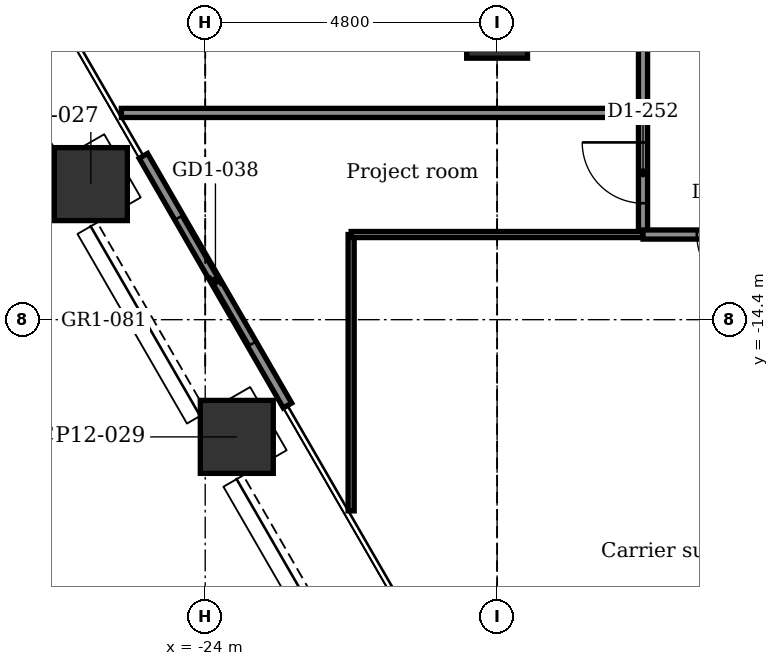
"""IFC4 building model, lengths in metres.
Left out: names, types, materials, properties, quantities, classifications, styles, units other than length and angle.
Written with IfcOpenShell. Run it as: python <this file> out.ifc"""

import sys

from ifc_helpers import new_model, si_unit, direction, frame, frame_2d, origin, origin_2d, place, context, subcontext, project, spatial, rectangle, extrude, element, fill, save


model = new_model("IFC4")
c1 = context("Model", 3, precision=1e-05, world=origin(), true_north=direction((0.0, 1.0)))
c2 = subcontext(c1, "Body", "Model", "MODEL_VIEW")
j1 = project(units=[si_unit("LENGTHUNIT", "METRE"), si_unit("PLANEANGLEUNIT", "RADIAN")], contexts=[c1])
p1 = place(None, origin())
s1 = spatial("IfcSite", under=j1, at=p1, CompositionType="ELEMENT")
p2 = place(p1, origin())
s2 = spatial("IfcBuilding", under=s1, at=p2, CompositionType="ELEMENT")
p3 = place(p2, frame((0.0, 0.0, 91.4)))
s3 = spatial("IfcBuildingStorey", under=s2, at=p3, CompositionType="ELEMENT", Elevation=91.4)
for number, where, z_axis, x_axis in (
    (1, (-23.48, -16.328, -0.2), (0.0, 0.0, 1.0), (0.866, 0.5, 0.0)),
    (2, (-25.88, -12.171, -0.2), (0.0, 0.0, 1.0), (0.866, 0.5, 0.0)),
):
    element("IfcColumn", number, at=place(p3, frame(where, z_axis=z_axis, x_axis=x_axis)), inside=s3, PredefinedType="COLUMN", context=c2, shape_type="SweptSolid", body=[
        extrude(rectangle(XDim=1.2, YDim=1.2, at=origin_2d()), origin(), (0.0, 0.0, 1.0), 4.5),
    ])
p4 = place(p3, frame((-19.2, -9.6, -0.2), z_axis=(0.0, 0.0, 1.0), x_axis=(1.0, 0.0, 0.0)))
e3 = element("IfcColumn", 3, at=p4, inside=s3, PredefinedType="COLUMN", context=c2, shape_type="SweptSolid", body=[
    extrude(rectangle(XDim=1.0, YDim=1.0, at=origin_2d()), origin(), (0.0, 0.0, 1.0), 4.5),
])
p5 = place(p3, frame((-22.647, -15.812, 0.0), z_axis=(0.0, 0.0, 1.0), x_axis=(-0.499978080042, 0.866038058908, 0.0)))
e4 = element("IfcWall", 4, at=p5, inside=s3, PredefinedType="PARTITIONING", context=c2, shape_type="SweptSolid", body=[
    extrude(rectangle(XDim=4.74, YDim=0.16, at=frame_2d((2.37, 0.0))), origin(), (0.0, 0.0, 1.0), 4.3),
])
p6 = place(p5, frame((1.17, 0.0, 0.0)))
e5 = element("IfcOpeningElement", 5, at=p6, cuts=e4, PredefinedType="OPENING", context=c2, shape_type="SweptSolid", body=[
    extrude(rectangle(XDim=2.4, YDim=2.4, at=frame_2d((1.2, 1.2))), frame((0.0, 0.09, 0.0), z_axis=(0.0, -1.0, 0.0), x_axis=(1.0, 0.0, 0.0)), (0.0, 0.0, 1.0), 0.18),
])
p7 = place(p3, frame((-16.8, -13.0, 0.0), z_axis=(0.0, 0.0, 1.0), x_axis=(0.0, 1.0, 0.0)))
e6 = element("IfcWall", 6, at=p7, inside=s3, PredefinedType="PARTITIONING", context=c2, shape_type="SweptSolid", body=[
    extrude(rectangle(XDim=9.05, YDim=0.15, at=frame_2d((4.525, 0.0))), origin(), (0.0, 0.0, 1.0), 4.3),
])
p8 = place(p7, frame((0.515, 0.0, 0.0)))
e7 = element("IfcOpeningElement", 7, at=p8, cuts=e6, PredefinedType="OPENING", context=c2, shape_type="SweptSolid", body=[
    extrude(rectangle(XDim=1.0, YDim=2.1, at=frame_2d((0.5, 1.05))), frame((0.0, 0.085, 0.0), z_axis=(0.0, -1.0, 0.0), x_axis=(1.0, 0.0, 0.0)), (0.0, 0.0, 1.0), 0.17),
])
p9 = place(p7, frame((5.8, 0.0, 0.0)))
e8 = element("IfcOpeningElement", 8, at=p9, cuts=e6, PredefinedType="OPENING", context=c2, shape_type="SweptSolid", body=[
    extrude(rectangle(XDim=1.0, YDim=2.1, at=frame_2d((0.5, 1.05))), frame((0.0, 0.085, 0.0), z_axis=(0.0, -1.0, 0.0), x_axis=(1.0, 0.0, 0.0)), (0.0, 0.0, 1.0), 0.17),
])
p10 = place(p3, frame((-21.6, -17.545, 0.0), z_axis=(0.0, 0.0, 1.0), x_axis=(0.0, 1.0, 0.0)))
e9 = element("IfcWall", 9, at=p10, inside=s3, PredefinedType="PARTITIONING", context=c2, shape_type="SweptSolid", body=[
    extrude(rectangle(XDim=4.545, YDim=0.1, at=frame_2d((2.272, 0.0))), origin(), (0.0, 0.0, 1.0), 4.3),
])
p11 = place(p3, frame((-21.6, -13.0, 0.0), z_axis=(0.0, 0.0, 1.0), x_axis=(1.0, 0.0, 0.0)))
e10 = element("IfcWall", 10, at=p11, inside=s3, PredefinedType="PARTITIONING", context=c2, shape_type="SweptSolid", body=[
    extrude(rectangle(XDim=4.8, YDim=0.1, at=frame_2d((2.4, 0.0))), origin(), (0.0, 0.0, 1.0), 4.3),
])
p12 = place(p3, frame((-16.8, -13.0, 0.0), z_axis=(0.0, 0.0, 1.0), x_axis=(1.0, 0.0, 0.0)))
e11 = element("IfcWall", 11, at=p12, inside=s3, PredefinedType="PARTITIONING", context=c2, shape_type="SweptSolid", body=[
    extrude(rectangle(XDim=31.324, YDim=0.15, at=frame_2d((15.662, 0.0))), origin(), (0.0, 0.0, 1.0), 4.3),
])
p13 = place(p12, frame((0.885, 0.0, 0.0)))
e12 = element("IfcOpeningElement", 12, at=p13, cuts=e11, PredefinedType="OPENING", context=c2, shape_type="SweptSolid", body=[
    extrude(rectangle(XDim=1.0, YDim=2.1, at=frame_2d((0.5, 1.05))), frame((0.0, 0.085, 0.0), z_axis=(0.0, -1.0, 0.0), x_axis=(1.0, 0.0, 0.0)), (0.0, 0.0, 1.0), 0.17),
])
p14 = place(p12, frame((5.5, 0.0, 0.0)))
e13 = element("IfcOpeningElement", 13, at=p14, cuts=e11, PredefinedType="OPENING", context=c2, shape_type="SweptSolid", body=[
    extrude(rectangle(XDim=1.0, YDim=2.1, at=frame_2d((0.5, 1.05))), frame((0.0, 0.085, 0.0), z_axis=(0.0, -1.0, 0.0), x_axis=(1.0, 0.0, 0.0)), (0.0, 0.0, 1.0), 0.17),
])
p15 = place(p12, frame((11.095, 0.0, 0.0)))
e14 = element("IfcOpeningElement", 14, at=p15, cuts=e11, PredefinedType="OPENING", context=c2, shape_type="SweptSolid", body=[
    extrude(rectangle(XDim=1.0, YDim=2.1, at=frame_2d((0.5, 1.05))), frame((0.0, 0.085, 0.0), z_axis=(0.0, -1.0, 0.0), x_axis=(1.0, 0.0, 0.0)), (0.0, 0.0, 1.0), 0.17),
])
p16 = place(p12, frame((15.175, 0.0, 0.0)))
e15 = element("IfcOpeningElement", 15, at=p16, cuts=e11, PredefinedType="OPENING", context=c2, shape_type="SweptSolid", body=[
    extrude(rectangle(XDim=1.0, YDim=2.1, at=frame_2d((0.5, 1.05))), frame((0.0, 0.085, 0.0), z_axis=(0.0, -1.0, 0.0), x_axis=(1.0, 0.0, 0.0)), (0.0, 0.0, 1.0), 0.17),
])
p17 = place(p12, frame((18.7, 0.0, 0.0)))
e16 = element("IfcOpeningElement", 16, at=p17, cuts=e11, PredefinedType="OPENING", context=c2, shape_type="SweptSolid", body=[
    extrude(rectangle(XDim=1.0, YDim=2.1, at=frame_2d((0.5, 1.05))), frame((0.0, 0.085, 0.0), z_axis=(0.0, -1.0, 0.0), x_axis=(1.0, 0.0, 0.0)), (0.0, 0.0, 1.0), 0.17),
])
p18 = place(p12, frame((23.5, 0.0, 0.0)))
e17 = element("IfcOpeningElement", 17, at=p18, cuts=e11, PredefinedType="OPENING", context=c2, shape_type="SweptSolid", body=[
    extrude(rectangle(XDim=1.0, YDim=2.1, at=frame_2d((0.5, 1.05))), frame((0.0, 0.085, 0.0), z_axis=(0.0, -1.0, 0.0), x_axis=(1.0, 0.0, 0.0)), (0.0, 0.0, 1.0), 0.17),
])
p19 = place(p12, frame((27.4, 0.0, 0.9)))
e18 = element("IfcOpeningElement", 18, at=p19, cuts=e11, PredefinedType="OPENING", context=c2, shape_type="SweptSolid", body=[
    extrude(rectangle(XDim=2.4, YDim=1.5, at=frame_2d((1.2, 0.75))), frame((0.0, 0.085, 0.0), z_axis=(0.0, -1.0, 0.0), x_axis=(1.0, 0.0, 0.0)), (0.0, 0.0, 1.0), 0.17),
])
p20 = place(p3, frame((-25.378, -11.0, 0.0), z_axis=(0.0, 0.0, 1.0), x_axis=(1.0, 0.0, 0.0)))
e19 = element("IfcWall", 19, at=p20, inside=s3, PredefinedType="PARTITIONING", context=c2, shape_type="SweptSolid", body=[
    extrude(rectangle(XDim=8.578, YDim=0.15, at=frame_2d((4.289, 0.0))), origin(), (0.0, 0.0, 1.0), 4.3),
])
p21 = place(p6, origin())
e20 = element("IfcDoor", 20, at=p21, inside=s3, OperationType="DOUBLE_DOOR_SLIDING", PredefinedType="DOOR", context=c2, shape_type="SweptSolid", body=[
    extrude(rectangle(XDim=2.4, YDim=2.4, at=frame_2d((1.2, 1.2))), frame((0.0, 0.025, 0.0), z_axis=(0.0, -1.0, 0.0), x_axis=(1.0, 0.0, 0.0)), (0.0, 0.0, 1.0), 0.05),
])
fill(e5, e20)
p22 = place(p13, frame((1.0, 0.0, 0.0), z_axis=(0.0, 0.0, 1.0), x_axis=(-1.0, 0.0, 0.0)))
e21 = element("IfcDoor", 21, at=p22, inside=s3, OperationType="SINGLE_SWING_RIGHT", PredefinedType="DOOR", context=c2, shape_type="SweptSolid", body=[
    extrude(rectangle(XDim=1.0, YDim=2.1, at=frame_2d((0.5, 1.05))), frame((0.0, 0.025, 0.0), z_axis=(0.0, -1.0, 0.0), x_axis=(1.0, 0.0, 0.0)), (0.0, 0.0, 1.0), 0.05),
])
fill(e12, e21)
p23 = place(p8, origin())
e22 = element("IfcDoor", 22, at=p23, inside=s3, OperationType="SINGLE_SWING_RIGHT", PredefinedType="DOOR", context=c2, shape_type="SweptSolid", body=[
    extrude(rectangle(XDim=1.0, YDim=2.1, at=frame_2d((0.5, 1.05))), frame((0.0, 0.025, 0.0), z_axis=(0.0, -1.0, 0.0), x_axis=(1.0, 0.0, 0.0)), (0.0, 0.0, 1.0), 0.05),
])
fill(e7, e22)
save(model, sys.argv[1])
